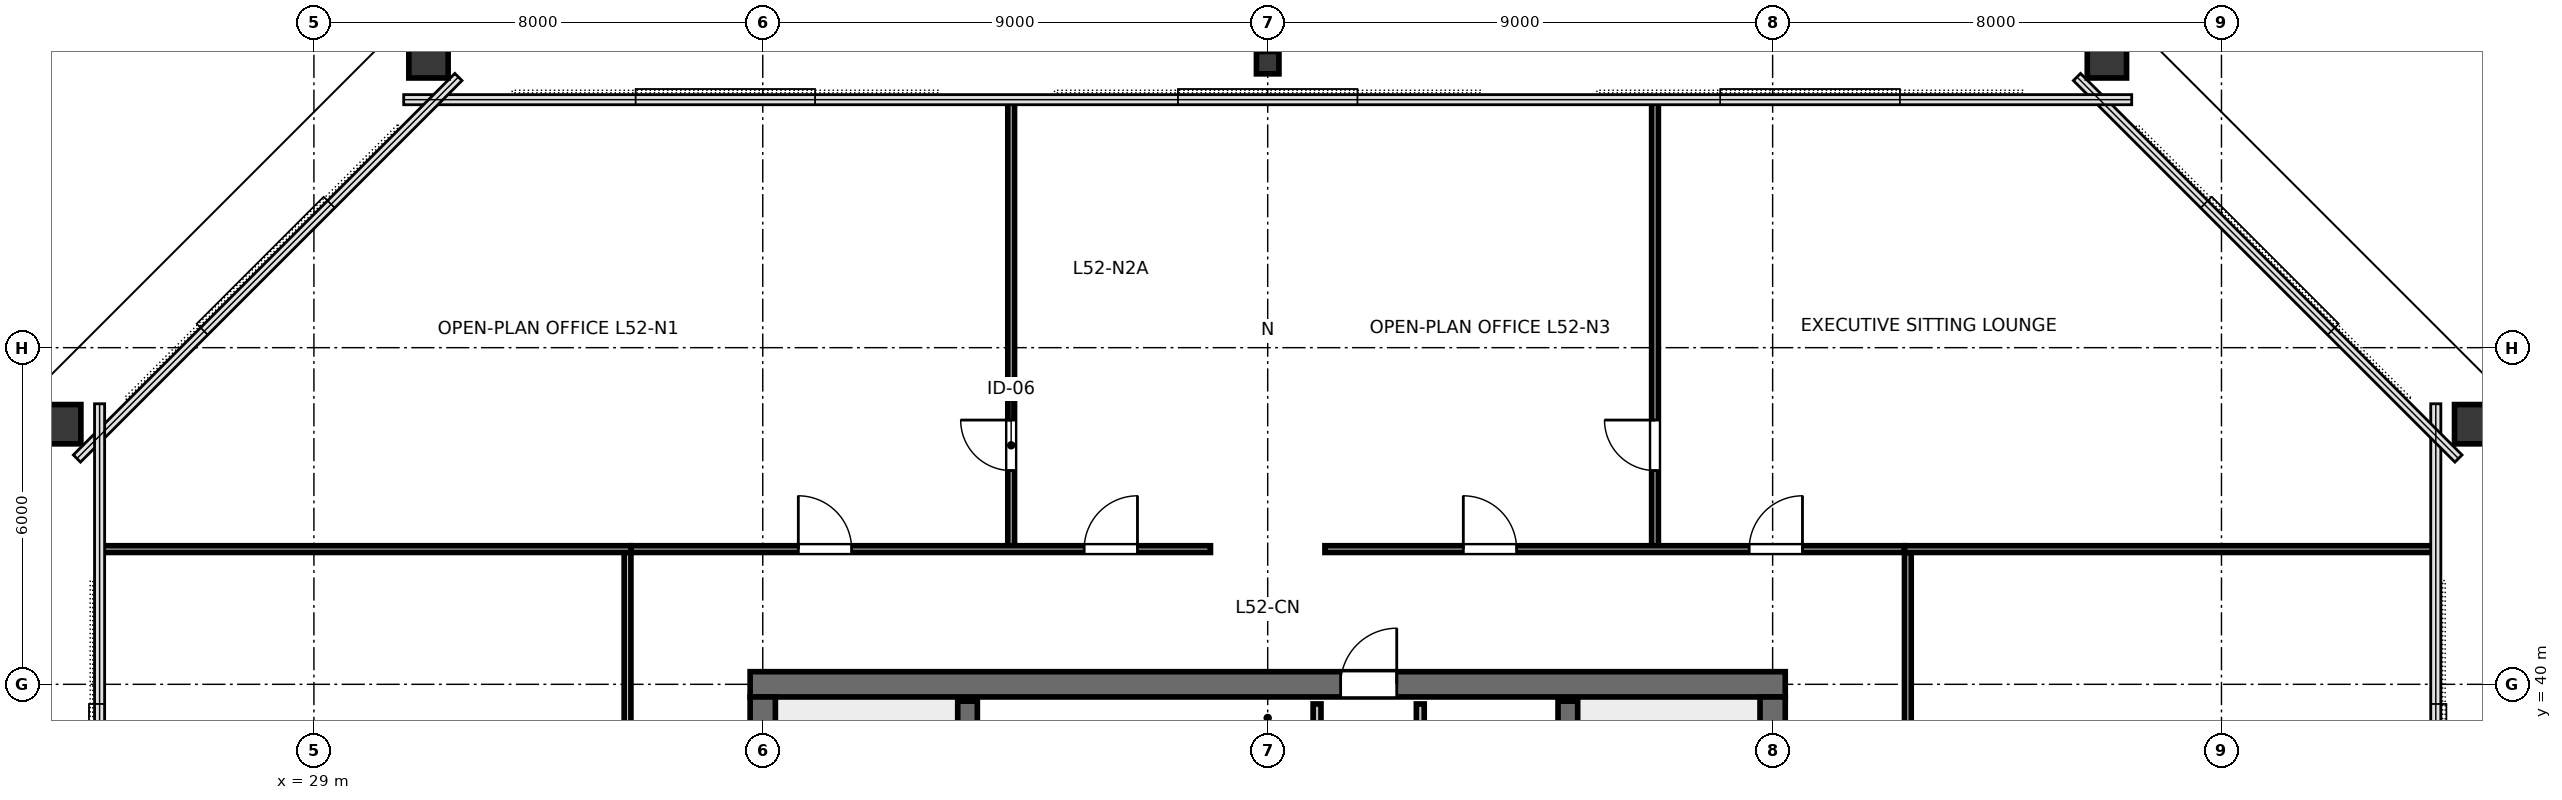
"""IFC4 building model, lengths in metres.
Left out: names, types, materials, properties, quantities, classifications, styles, units other than length and angle.
Written with IfcOpenShell. Run it as: python <this file> out.ifc"""

import sys

from ifc_helpers import new_model, si_unit, direction, frame, frame_2d, origin, origin_2d, place, context, subcontext, project, spatial, rectangle, hollow_rectangle, i_section, extrude, element, fill, save


model = new_model("IFC4")
c1 = context("Model", 3, precision=1e-05, world=origin(), true_north=direction((0.0, 1.0)))
c2 = subcontext(c1, "Body", "Model", "MODEL_VIEW")
j1 = project(units=[si_unit("LENGTHUNIT", "METRE"), si_unit("PLANEANGLEUNIT", "RADIAN")], contexts=[c1])
p1 = place(None, origin())
s1 = spatial("IfcSite", under=j1, at=p1, CompositionType="ELEMENT")
p2 = place(p1, origin())
s2 = spatial("IfcBuilding", under=s1, at=p2, CompositionType="ELEMENT")
p3 = place(p2, frame((0.0, 0.0, 198.6)))
s3 = spatial("IfcBuildingStorey", under=s2, at=p3, CompositionType="ELEMENT", Elevation=198.6)
p4 = place(p3, frame((36.775, 40.0, 0.0), z_axis=(0.0, 0.0, 1.0), x_axis=(1.0, 0.0, 0.0)))
e1 = element("IfcWall", 1, at=p4, inside=s3, PredefinedType="SHEAR", context=c2, shape_type="SweptSolid", body=[
    extrude(rectangle(XDim=18.45, YDim=0.45, at=frame_2d((9.225, 0.0))), origin(), (0.0, 0.0, 1.0), 3.36),
])
p5 = place(p4, frame((10.525, 0.0, 0.0)))
e2 = element("IfcOpeningElement", 2, at=p5, cuts=e1, PredefinedType="OPENING", context=c2, shape_type="SweptSolid", body=[
    extrude(rectangle(XDim=1.0, YDim=2.15, at=frame_2d((0.5, 1.075))), frame((0.0, 0.235, 0.0), z_axis=(0.0, -1.0, 0.0), x_axis=(1.0, 0.0, 0.0)), (0.0, 0.0, 1.0), 0.47),
])
p6 = place(p3, frame((37.0, 24.225, 0.0), z_axis=(0.0, 0.0, 1.0), x_axis=(0.0, 1.0, 0.0)))
e3 = element("IfcWall", 3, at=p6, inside=s3, PredefinedType="SHEAR", context=c2, shape_type="SweptSolid", body=[
    extrude(rectangle(XDim=15.55, YDim=0.45, at=frame_2d((7.775, 0.0))), origin(), (0.0, 0.0, 1.0), 3.36),
])
p7 = place(p6, frame((5.3, 0.0, 0.0)))
e4 = element("IfcOpeningElement", 4, at=p7, cuts=e3, PredefinedType="OPENING", context=c2, shape_type="SweptSolid", body=[
    extrude(rectangle(XDim=1.15, YDim=2.15, at=frame_2d((0.575, 1.075))), frame((0.0, 0.235, 0.0), z_axis=(0.0, -1.0, 0.0), x_axis=(1.0, 0.0, 0.0)), (0.0, 0.0, 1.0), 0.47),
])
p8 = place(p3, frame((55.0, 24.225, 0.0), z_axis=(0.0, 0.0, 1.0), x_axis=(0.0, 1.0, 0.0)))
e5 = element("IfcWall", 5, at=p8, inside=s3, PredefinedType="SHEAR", context=c2, shape_type="SweptSolid", body=[
    extrude(rectangle(XDim=15.55, YDim=0.45, at=frame_2d((7.775, 0.0))), origin(), (0.0, 0.0, 1.0), 3.36),
])
p9 = place(p8, frame((5.3, 0.0, 0.0)))
e6 = element("IfcOpeningElement", 6, at=p9, cuts=e5, PredefinedType="OPENING", context=c2, shape_type="SweptSolid", body=[
    extrude(rectangle(XDim=1.15, YDim=2.15, at=frame_2d((0.575, 1.075))), frame((0.0, 0.235, 0.0), z_axis=(0.0, -1.0, 0.0), x_axis=(1.0, 0.0, 0.0)), (0.0, 0.0, 1.0), 0.47),
])
for number, where, z_axis, x_axis in (
    (7, (67.579, 44.636, 0.0), (0.0, 0.0, 1.0), (0.0, 1.0, 0.0)),
    (8, (60.958, 51.232, 0.0), (0.0, 0.0, 1.0), (1.0, 0.0, 0.0)),
):
    element("IfcColumn", number, at=place(p3, frame(where, z_axis=z_axis, x_axis=x_axis)), inside=s3, PredefinedType="COLUMN", context=c2, shape_type="SweptSolid", body=[
        extrude(hollow_rectangle(XDim=0.7, YDim=0.85, WallThickness=0.04, at=origin_2d()), origin(), (0.0, 0.0, 1.0), 3.373),
    ])
p10 = place(p3, frame((46.0, 51.08, 0.0), z_axis=(0.0, 0.0, 1.0), x_axis=(1.0, 0.0, 0.0)))
e9 = element("IfcColumn", 9, at=p10, inside=s3, PredefinedType="COLUMN", context=c2, shape_type="SweptSolid", body=[
    extrude(i_section(OverallWidth=0.401, OverallDepth=0.399, WebThickness=0.025, FlangeThickness=0.04, FilletRadius=0.025, at=origin_2d()), origin(), (0.0, 0.0, 1.0), 3.373),
])
for number, where, z_axis, x_axis in (
    (10, (31.042, 51.232, 0.0), (0.0, 0.0, 1.0), (1.0, 0.0, 0.0)),
    (11, (24.421, 44.636, 0.0), (0.0, 0.0, 1.0), (0.0, 1.0, 0.0)),
):
    element("IfcColumn", number, at=place(p3, frame(where, z_axis=z_axis, x_axis=x_axis)), inside=s3, PredefinedType="COLUMN", context=c2, shape_type="SweptSolid", body=[
        extrude(hollow_rectangle(XDim=0.7, YDim=0.85, WallThickness=0.04, at=origin_2d()), origin(), (0.0, 0.0, 1.0), 3.373),
    ])
for number, where, z_axis, x_axis in (
    (12, (40.65, 32.0, 0.0), (0.0, 0.0, 1.0), (0.0, 1.0, 0.0)),
    (13, (51.35, 32.0, 0.0), (0.0, 0.0, 1.0), (0.0, 1.0, 0.0)),
):
    element("IfcWall", number, at=place(p3, frame(where, z_axis=z_axis, x_axis=x_axis)), inside=s3, PredefinedType="SHEAR", context=c2, shape_type="SweptSolid", body=[
        extrude(rectangle(XDim=7.7, YDim=0.35, at=frame_2d((3.85, 0.0))), origin(), (0.0, 0.0, 1.0), 3.6),
    ])
p11 = place(p3, frame((46.88, 32.05, 0.0), z_axis=(0.0, 0.0, 1.0), x_axis=(0.0, 1.0, 0.0)))
e14 = element("IfcWall", 14, at=p11, inside=s3, PredefinedType="PARTITIONING", context=c2, shape_type="SweptSolid", body=[
    extrude(rectangle(XDim=7.6, YDim=0.14, at=frame_2d((3.8, 0.0))), origin(), (0.0, 0.0, 1.0), 3.375),
])
p12 = place(p11, frame((3.4, 0.0, 0.0)))
e15 = element("IfcOpeningElement", 15, at=p12, cuts=e14, PredefinedType="OPENING", context=c2, shape_type="SweptSolid", body=[
    extrude(rectangle(XDim=0.95, YDim=2.15, at=frame_2d((0.475, 1.075))), frame((0.0, 0.08, 0.0), z_axis=(0.0, -1.0, 0.0), x_axis=(1.0, 0.0, 0.0)), (0.0, 0.0, 1.0), 0.16),
])
p13 = place(p3, frame((48.72, 32.05, 0.0), z_axis=(0.0, 0.0, 1.0), x_axis=(0.0, 1.0, 0.0)))
e16 = element("IfcWall", 16, at=p13, inside=s3, PredefinedType="PARTITIONING", context=c2, shape_type="SweptSolid", body=[
    extrude(rectangle(XDim=7.6, YDim=0.14, at=frame_2d((3.8, 0.0))), origin(), (0.0, 0.0, 1.0), 3.375),
])
p14 = place(p13, frame((0.8, 0.0, 0.0)))
e17 = element("IfcOpeningElement", 17, at=p14, cuts=e16, PredefinedType="OPENING", context=c2, shape_type="SweptSolid", body=[
    extrude(rectangle(XDim=0.9, YDim=2.15, at=frame_2d((0.45, 1.075))), frame((0.0, 0.08, 0.0), z_axis=(0.0, -1.0, 0.0), x_axis=(1.0, 0.0, 0.0)), (0.0, 0.0, 1.0), 0.16),
])
p15 = place(p13, frame((3.35, 0.0, 0.0)))
e18 = element("IfcOpeningElement", 18, at=p15, cuts=e16, PredefinedType="OPENING", context=c2, shape_type="SweptSolid", body=[
    extrude(rectangle(XDim=0.9, YDim=2.15, at=frame_2d((0.45, 1.075))), frame((0.0, 0.08, 0.0), z_axis=(0.0, -1.0, 0.0), x_axis=(1.0, 0.0, 0.0)), (0.0, 0.0, 1.0), 0.16),
])
p16 = place(p13, frame((5.9, 0.0, 0.0)))
e19 = element("IfcOpeningElement", 19, at=p16, cuts=e16, PredefinedType="OPENING", context=c2, shape_type="SweptSolid", body=[
    extrude(rectangle(XDim=0.92, YDim=2.15, at=frame_2d((0.46, 1.075))), frame((0.0, 0.08, 0.0), z_axis=(0.0, -1.0, 0.0), x_axis=(1.0, 0.0, 0.0)), (0.0, 0.0, 1.0), 0.16),
])
p17 = place(p3, frame((41.428, 42.41, 0.0), z_axis=(0.0, 0.0, 1.0), x_axis=(0.0, 1.0, 0.0)))
e20 = element("IfcWall", 20, at=p17, inside=s3, PredefinedType="PARTITIONING", context=c2, shape_type="SweptSolid", body=[
    extrude(rectangle(XDim=8.01, YDim=0.12, at=frame_2d((4.005, 0.0))), origin(), (0.0, 0.0, 1.0), 2.655),
])
p18 = place(p17, frame((1.4, 0.0, 0.0)))
e21 = element("IfcOpeningElement", 21, at=p18, cuts=e20, PredefinedType="OPENING", context=c2, shape_type="SweptSolid", body=[
    extrude(rectangle(XDim=0.9, YDim=2.15, at=frame_2d((0.45, 1.075))), frame((0.0, 0.07, 0.0), z_axis=(0.0, -1.0, 0.0), x_axis=(1.0, 0.0, 0.0)), (0.0, 0.0, 1.0), 0.14),
])
p19 = place(p3, frame((52.903, 42.41, 0.0), z_axis=(0.0, 0.0, 1.0), x_axis=(0.0, 1.0, 0.0)))
e22 = element("IfcWall", 22, at=p19, inside=s3, PredefinedType="PARTITIONING", context=c2, shape_type="SweptSolid", body=[
    extrude(rectangle(XDim=8.01, YDim=0.12, at=frame_2d((4.005, 0.0))), origin(), (0.0, 0.0, 1.0), 2.655),
])
p20 = place(p19, frame((1.4, 0.0, 0.0)))
e23 = element("IfcOpeningElement", 23, at=p20, cuts=e22, PredefinedType="OPENING", context=c2, shape_type="SweptSolid", body=[
    extrude(rectangle(XDim=0.9, YDim=2.15, at=frame_2d((0.45, 1.075))), frame((0.0, 0.07, 0.0), z_axis=(0.0, -1.0, 0.0), x_axis=(1.0, 0.0, 0.0)), (0.0, 0.0, 1.0), 0.14),
])
p21 = place(p3, frame((34.65, 42.41, 0.0), z_axis=(0.0, 0.0, 1.0), x_axis=(1.0, 0.0, 0.0)))
e24 = element("IfcWall", 24, at=p21, inside=s3, PredefinedType="PARTITIONING", context=c2, shape_type="SweptSolid", body=[
    extrude(rectangle(XDim=10.33, YDim=0.12, at=frame_2d((5.165, 0.0))), origin(), (0.0, 0.0, 1.0), 2.655),
])
p22 = place(p21, frame((2.984, 0.0, 0.0)))
e25 = element("IfcOpeningElement", 25, at=p22, cuts=e24, PredefinedType="OPENING", context=c2, shape_type="SweptSolid", body=[
    extrude(rectangle(XDim=0.95, YDim=2.15, at=frame_2d((0.475, 1.075))), frame((0.0, 0.07, 0.0), z_axis=(0.0, -1.0, 0.0), x_axis=(1.0, 0.0, 0.0)), (0.0, 0.0, 1.0), 0.14),
])
p23 = place(p21, frame((8.079, 0.0, 0.0)))
e26 = element("IfcOpeningElement", 26, at=p23, cuts=e24, PredefinedType="OPENING", context=c2, shape_type="SweptSolid", body=[
    extrude(rectangle(XDim=0.95, YDim=2.15, at=frame_2d((0.475, 1.075))), frame((0.0, 0.07, 0.0), z_axis=(0.0, -1.0, 0.0), x_axis=(1.0, 0.0, 0.0)), (0.0, 0.0, 1.0), 0.14),
])
p24 = place(p3, frame((47.02, 42.41, 0.0), z_axis=(0.0, 0.0, 1.0), x_axis=(1.0, 0.0, 0.0)))
e27 = element("IfcWall", 27, at=p24, inside=s3, PredefinedType="PARTITIONING", context=c2, shape_type="SweptSolid", body=[
    extrude(rectangle(XDim=10.33, YDim=0.12, at=frame_2d((5.165, 0.0))), origin(), (0.0, 0.0, 1.0), 2.655),
])
p25 = place(p24, frame((2.467, 0.0, 0.0)))
e28 = element("IfcOpeningElement", 28, at=p25, cuts=e27, PredefinedType="OPENING", context=c2, shape_type="SweptSolid", body=[
    extrude(rectangle(XDim=0.95, YDim=2.15, at=frame_2d((0.475, 1.075))), frame((0.0, 0.07, 0.0), z_axis=(0.0, -1.0, 0.0), x_axis=(1.0, 0.0, 0.0)), (0.0, 0.0, 1.0), 0.14),
])
p26 = place(p24, frame((7.562, 0.0, 0.0)))
e29 = element("IfcOpeningElement", 29, at=p26, cuts=e27, PredefinedType="OPENING", context=c2, shape_type="SweptSolid", body=[
    extrude(rectangle(XDim=0.95, YDim=2.15, at=frame_2d((0.475, 1.075))), frame((0.0, 0.07, 0.0), z_axis=(0.0, -1.0, 0.0), x_axis=(1.0, 0.0, 0.0)), (0.0, 0.0, 1.0), 0.14),
])
p27 = place(p3, frame((34.59, 21.65, 0.0), z_axis=(0.0, 0.0, 1.0), x_axis=(0.0, 1.0, 0.0)))
e30 = element("IfcWall", 30, at=p27, inside=s3, PredefinedType="PARTITIONING", context=c2, shape_type="SweptSolid", body=[
    extrude(rectangle(XDim=20.7, YDim=0.12, at=frame_2d((10.35, 0.0))), origin(), (0.0, 0.0, 1.0), 2.655),
])
p28 = place(p27, frame((2.698, 0.0, 0.0)))
e31 = element("IfcOpeningElement", 31, at=p28, cuts=e30, PredefinedType="OPENING", context=c2, shape_type="SweptSolid", body=[
    extrude(rectangle(XDim=0.95, YDim=2.15, at=frame_2d((0.475, 1.075))), frame((0.0, 0.07, 0.0), z_axis=(0.0, -1.0, 0.0), x_axis=(1.0, 0.0, 0.0)), (0.0, 0.0, 1.0), 0.14),
])
p29 = place(p27, frame((8.556, 0.0, 0.0)))
e32 = element("IfcOpeningElement", 32, at=p29, cuts=e30, PredefinedType="OPENING", context=c2, shape_type="SweptSolid", body=[
    extrude(rectangle(XDim=0.95, YDim=2.15, at=frame_2d((0.475, 1.075))), frame((0.0, 0.07, 0.0), z_axis=(0.0, -1.0, 0.0), x_axis=(1.0, 0.0, 0.0)), (0.0, 0.0, 1.0), 0.14),
])
p30 = place(p27, frame((15.733, 0.0, 0.0)))
e33 = element("IfcOpeningElement", 33, at=p30, cuts=e30, PredefinedType="OPENING", context=c2, shape_type="SweptSolid", body=[
    extrude(rectangle(XDim=0.95, YDim=2.15, at=frame_2d((0.475, 1.075))), frame((0.0, 0.07, 0.0), z_axis=(0.0, -1.0, 0.0), x_axis=(1.0, 0.0, 0.0)), (0.0, 0.0, 1.0), 0.14),
])
p31 = place(p3, frame((57.41, 21.65, 0.0), z_axis=(0.0, 0.0, 1.0), x_axis=(0.0, 1.0, 0.0)))
e34 = element("IfcWall", 34, at=p31, inside=s3, PredefinedType="PARTITIONING", context=c2, shape_type="SweptSolid", body=[
    extrude(rectangle(XDim=20.7, YDim=0.12, at=frame_2d((10.35, 0.0))), origin(), (0.0, 0.0, 1.0), 2.655),
])
p32 = place(p31, frame((5.525, 0.0, 0.0)))
e35 = element("IfcOpeningElement", 35, at=p32, cuts=e34, PredefinedType="OPENING", context=c2, shape_type="SweptSolid", body=[
    extrude(rectangle(XDim=0.95, YDim=2.15, at=frame_2d((0.475, 1.075))), frame((0.0, 0.07, 0.0), z_axis=(0.0, -1.0, 0.0), x_axis=(1.0, 0.0, 0.0)), (0.0, 0.0, 1.0), 0.14),
])
p33 = place(p31, frame((15.675, 0.0, 0.0)))
e36 = element("IfcOpeningElement", 36, at=p33, cuts=e34, PredefinedType="OPENING", context=c2, shape_type="SweptSolid", body=[
    extrude(rectangle(XDim=0.95, YDim=2.15, at=frame_2d((0.475, 1.075))), frame((0.0, 0.07, 0.0), z_axis=(0.0, -1.0, 0.0), x_axis=(1.0, 0.0, 0.0)), (0.0, 0.0, 1.0), 0.14),
])
for number, where, z_axis, x_axis in (
    (37, (34.65, 42.41, 0.0), (0.0, 0.0, 1.0), (-1.0, 0.0, 0.0)),
    (38, (57.35, 42.41, 0.0), (0.0, 0.0, 1.0), (1.0, 0.0, 0.0)),
):
    element("IfcWall", number, at=place(p3, frame(where, z_axis=z_axis, x_axis=x_axis)), inside=s3, PredefinedType="PARTITIONING", context=c2, shape_type="SweptSolid", body=[
        extrude(rectangle(XDim=9.47, YDim=0.12, at=frame_2d((4.735, 0.0))), origin(), (0.0, 0.0, 1.0), 2.655),
    ])
p34 = place(p5, origin())
e39 = element("IfcDoor", 39, at=p34, inside=s3, OperationType="SINGLE_SWING_RIGHT", PredefinedType="DOOR", context=c2, shape_type="SweptSolid", body=[
    extrude(rectangle(XDim=1.0, YDim=2.15, at=frame_2d((0.5, 1.075))), frame((0.0, 0.025, 0.0), z_axis=(0.0, -1.0, 0.0), x_axis=(1.0, 0.0, 0.0)), (0.0, 0.0, 1.0), 0.05),
])
fill(e2, e39)
p35 = place(p18, origin())
e40 = element("IfcDoor", 40, at=p35, inside=s3, OperationType="SINGLE_SWING_RIGHT", PredefinedType="DOOR", context=c2, shape_type="SweptSolid", body=[
    extrude(rectangle(XDim=0.9, YDim=2.15, at=frame_2d((0.45, 1.075))), frame((0.0, 0.025, 0.0), z_axis=(0.0, -1.0, 0.0), x_axis=(1.0, 0.0, 0.0)), (0.0, 0.0, 1.0), 0.05),
])
fill(e21, e40)
p36 = place(p20, origin())
e41 = element("IfcDoor", 41, at=p36, inside=s3, OperationType="SINGLE_SWING_RIGHT", PredefinedType="DOOR", context=c2, shape_type="SweptSolid", body=[
    extrude(rectangle(XDim=0.9, YDim=2.15, at=frame_2d((0.45, 1.075))), frame((0.0, 0.025, 0.0), z_axis=(0.0, -1.0, 0.0), x_axis=(1.0, 0.0, 0.0)), (0.0, 0.0, 1.0), 0.05),
])
fill(e23, e41)
p37 = place(p22, origin())
e42 = element("IfcDoor", 42, at=p37, inside=s3, OperationType="SINGLE_SWING_LEFT", PredefinedType="DOOR", context=c2, shape_type="SweptSolid", body=[
    extrude(rectangle(XDim=0.95, YDim=2.15, at=frame_2d((0.475, 1.075))), frame((0.0, 0.025, 0.0), z_axis=(0.0, -1.0, 0.0), x_axis=(1.0, 0.0, 0.0)), (0.0, 0.0, 1.0), 0.05),
])
fill(e25, e42)
p38 = place(p23, origin())
e43 = element("IfcDoor", 43, at=p38, inside=s3, OperationType="SINGLE_SWING_RIGHT", PredefinedType="DOOR", context=c2, shape_type="SweptSolid", body=[
    extrude(rectangle(XDim=0.95, YDim=2.15, at=frame_2d((0.475, 1.075))), frame((0.0, 0.025, 0.0), z_axis=(0.0, -1.0, 0.0), x_axis=(1.0, 0.0, 0.0)), (0.0, 0.0, 1.0), 0.05),
])
fill(e26, e43)
p39 = place(p25, origin())
e44 = element("IfcDoor", 44, at=p39, inside=s3, OperationType="SINGLE_SWING_LEFT", PredefinedType="DOOR", context=c2, shape_type="SweptSolid", body=[
    extrude(rectangle(XDim=0.95, YDim=2.15, at=frame_2d((0.475, 1.075))), frame((0.0, 0.025, 0.0), z_axis=(0.0, -1.0, 0.0), x_axis=(1.0, 0.0, 0.0)), (0.0, 0.0, 1.0), 0.05),
])
fill(e28, e44)
p40 = place(p26, origin())
e45 = element("IfcDoor", 45, at=p40, inside=s3, OperationType="SINGLE_SWING_RIGHT", PredefinedType="DOOR", context=c2, shape_type="SweptSolid", body=[
    extrude(rectangle(XDim=0.95, YDim=2.15, at=frame_2d((0.475, 1.075))), frame((0.0, 0.025, 0.0), z_axis=(0.0, -1.0, 0.0), x_axis=(1.0, 0.0, 0.0)), (0.0, 0.0, 1.0), 0.05),
])
fill(e29, e45)
save(model, sys.argv[1])
